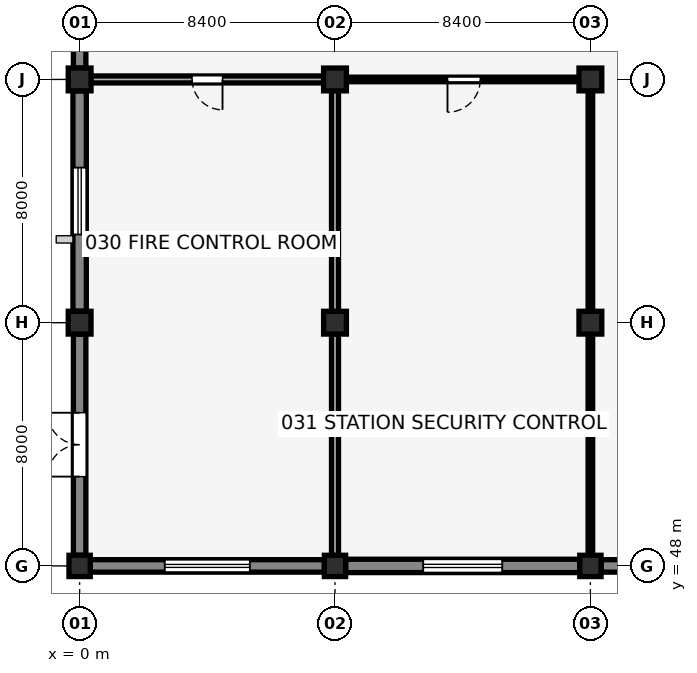
"""IFC4 building model, lengths in metres.
Left out: names, types, materials, properties, quantities, classifications, styles, units other than length and angle.
Written with IfcOpenShell. Run it as: python <this file> out.ifc"""

import sys

from ifc_helpers import new_model, si_unit, direction, frame, frame_2d, origin, origin_2d, place, context, subcontext, project, spatial, rectangle, extrude, element, fill, save


model = new_model("IFC4")
c1 = context("Model", 3, precision=1e-05, world=origin(), true_north=direction((0.0, 1.0)))
c2 = subcontext(c1, "Body", "Model", "MODEL_VIEW")
j1 = project(units=[si_unit("LENGTHUNIT", "METRE"), si_unit("PLANEANGLEUNIT", "RADIAN")], contexts=[c1])
p1 = place(None, origin())
s1 = spatial("IfcSite", under=j1, at=p1, CompositionType="ELEMENT")
p2 = place(p1, origin())
s2 = spatial("IfcBuilding", under=s1, at=p2, CompositionType="ELEMENT")
p3 = place(p2, origin())
s3 = spatial("IfcBuildingStorey", under=s2, at=p3, CompositionType="ELEMENT", Elevation=0.0)
p4 = place(p3, frame((0.0, 48.0, 0.0), z_axis=(0.0, 0.0, 1.0), x_axis=(1.0, 0.0, 0.0)))
e1 = element("IfcColumn", 1, at=p4, inside=s3, PredefinedType="COLUMN", context=c2, shape_type="SweptSolid", body=[
    extrude(rectangle(XDim=0.7, YDim=0.7, at=origin_2d()), origin(), (0.0, 0.0, 1.0), 5.15),
])
for number, where, z_axis, x_axis in (
    (2, (0.0, 56.0, 0.0), (0.0, 0.0, 1.0), (1.0, 0.0, 0.0)),
    (3, (0.0, 64.0, 0.0), (0.0, 0.0, 1.0), (1.0, 0.0, 0.0)),
):
    element("IfcColumn", number, at=place(p3, frame(where, z_axis=z_axis, x_axis=x_axis)), inside=s3, PredefinedType="COLUMN", context=c2, shape_type="SweptSolid", body=[
        extrude(rectangle(XDim=0.75, YDim=0.75, at=origin_2d()), origin(), (0.0, 0.0, 1.0), 5.15),
    ])
p5 = place(p3, frame((8.4, 48.0, 0.0), z_axis=(0.0, 0.0, 1.0), x_axis=(1.0, 0.0, 0.0)))
e4 = element("IfcColumn", 4, at=p5, inside=s3, PredefinedType="COLUMN", context=c2, shape_type="SweptSolid", body=[
    extrude(rectangle(XDim=0.7, YDim=0.7, at=origin_2d()), origin(), (0.0, 0.0, 1.0), 5.15),
])
for number, where, z_axis, x_axis in (
    (5, (8.4, 56.0, 0.0), (0.0, 0.0, 1.0), (1.0, 0.0, 0.0)),
    (6, (8.4, 64.0, 0.0), (0.0, 0.0, 1.0), (1.0, 0.0, 0.0)),
):
    element("IfcColumn", number, at=place(p3, frame(where, z_axis=z_axis, x_axis=x_axis)), inside=s3, PredefinedType="COLUMN", context=c2, shape_type="SweptSolid", body=[
        extrude(rectangle(XDim=0.75, YDim=0.75, at=origin_2d()), origin(), (0.0, 0.0, 1.0), 5.15),
    ])
p6 = place(p3, frame((16.8, 48.0, 0.0), z_axis=(0.0, 0.0, 1.0), x_axis=(1.0, 0.0, 0.0)))
e7 = element("IfcColumn", 7, at=p6, inside=s3, PredefinedType="COLUMN", context=c2, shape_type="SweptSolid", body=[
    extrude(rectangle(XDim=0.7, YDim=0.7, at=origin_2d()), origin(), (0.0, 0.0, 1.0), 5.15),
])
for number, where, z_axis, x_axis in (
    (8, (16.8, 56.0, 0.0), (0.0, 0.0, 1.0), (1.0, 0.0, 0.0)),
    (9, (16.8, 64.0, 0.0), (0.0, 0.0, 1.0), (1.0, 0.0, 0.0)),
):
    element("IfcColumn", number, at=place(p3, frame(where, z_axis=z_axis, x_axis=x_axis)), inside=s3, PredefinedType="COLUMN", context=c2, shape_type="SweptSolid", body=[
        extrude(rectangle(XDim=0.75, YDim=0.75, at=origin_2d()), origin(), (0.0, 0.0, 1.0), 5.15),
    ])
p7 = place(p3, frame((0.35, 48.0, 0.0), z_axis=(0.0, 0.0, 1.0), x_axis=(1.0, 0.0, 0.0)))
e10 = element("IfcWall", 10, at=p7, inside=s3, PredefinedType="SOLIDWALL", context=c2, shape_type="SweptSolid", body=[
    extrude(rectangle(XDim=7.7, YDim=0.41, at=frame_2d((3.85, 0.0))), origin(), (0.0, 0.0, 1.0), 4.74),
])
p8 = place(p7, frame((2.45, 0.0, 0.9), z_axis=(0.0, 0.0, 1.0), x_axis=(1.0, 0.0, 0.0)))
e11 = element("IfcOpeningElement", 11, at=p8, cuts=e10, PredefinedType="OPENING", context=c2, shape_type="SweptSolid", body=[
    extrude(rectangle(XDim=2.8, YDim=1.6, at=frame_2d((1.4, 0.8))), frame((0.0, 0.215, 0.0), z_axis=(0.0, -1.0, 0.0), x_axis=(1.0, 0.0, 0.0)), (0.0, 0.0, 1.0), 0.43),
])
p9 = place(p3, frame((8.75, 48.0, 0.0), z_axis=(0.0, 0.0, 1.0), x_axis=(1.0, 0.0, 0.0)))
e12 = element("IfcWall", 12, at=p9, inside=s3, PredefinedType="SOLIDWALL", context=c2, shape_type="SweptSolid", body=[
    extrude(rectangle(XDim=7.7, YDim=0.44, at=frame_2d((3.85, 0.0))), origin(), (0.0, 0.0, 1.0), 4.74),
])
p10 = place(p9, frame((2.55, 0.0, 0.9), z_axis=(0.0, 0.0, 1.0), x_axis=(1.0, 0.0, 0.0)))
e13 = element("IfcOpeningElement", 13, at=p10, cuts=e12, PredefinedType="OPENING", context=c2, shape_type="SweptSolid", body=[
    extrude(rectangle(XDim=2.6, YDim=1.8, at=frame_2d((1.3, 0.9))), frame((0.0, 0.23, 0.0), z_axis=(0.0, -1.0, 0.0), x_axis=(1.0, 0.0, 0.0)), (0.0, 0.0, 1.0), 0.46),
])
p11 = place(p3, frame((17.15, 48.0, 0.0), z_axis=(0.0, 0.0, 1.0), x_axis=(1.0, 0.0, 0.0)))
e14 = element("IfcWall", 14, at=p11, inside=s3, PredefinedType="SOLIDWALL", context=c2, shape_type="SweptSolid", body=[
    extrude(rectangle(XDim=7.7, YDim=0.41, at=frame_2d((3.85, 0.0))), origin(), (0.0, 0.0, 1.0), 4.74),
])
p12 = place(p11, frame((2.65, 0.0, 0.9), z_axis=(0.0, 0.0, 1.0), x_axis=(1.0, 0.0, 0.0)))
e15 = element("IfcOpeningElement", 15, at=p12, cuts=e14, PredefinedType="OPENING", context=c2, shape_type="SweptSolid", body=[
    extrude(rectangle(XDim=2.4, YDim=1.75, at=frame_2d((1.2, 0.875))), frame((0.0, 0.215, 0.0), z_axis=(0.0, -1.0, 0.0), x_axis=(1.0, 0.0, 0.0)), (0.0, 0.0, 1.0), 0.43),
])
p13 = place(p3, frame((0.0, 48.35, 0.0), z_axis=(0.0, 0.0, 1.0), x_axis=(0.0, 1.0, 0.0)))
e16 = element("IfcWall", 16, at=p13, inside=s3, PredefinedType="SOLIDWALL", context=c2, shape_type="SweptSolid", body=[
    extrude(rectangle(XDim=7.275, YDim=0.41, at=frame_2d((3.637, 0.0))), origin(), (0.0, 0.0, 1.0), 4.747),
])
p14 = place(p13, frame((2.587, 0.0, 0.0), z_axis=(0.0, 0.0, 1.0), x_axis=(1.0, 0.0, 0.0)))
e17 = element("IfcOpeningElement", 17, at=p14, cuts=e16, PredefinedType="OPENING", context=c2, shape_type="SweptSolid", body=[
    extrude(rectangle(XDim=2.1, YDim=2.45, at=frame_2d((1.05, 1.225))), frame((0.0, 0.215, 0.0), z_axis=(0.0, -1.0, 0.0), x_axis=(1.0, 0.0, 0.0)), (0.0, 0.0, 1.0), 0.43),
])
p15 = place(p3, frame((0.0, 56.375, 0.0), z_axis=(0.0, 0.0, 1.0), x_axis=(0.0, 1.0, 0.0)))
e18 = element("IfcWall", 18, at=p15, inside=s3, PredefinedType="SOLIDWALL", context=c2, shape_type="SweptSolid", body=[
    extrude(rectangle(XDim=7.25, YDim=0.44, at=frame_2d((3.625, 0.0))), origin(), (0.0, 0.0, 1.0), 4.747),
])
p16 = place(p15, frame((2.525, 0.0, 0.9), z_axis=(0.0, 0.0, 1.0), x_axis=(1.0, 0.0, 0.0)))
e19 = element("IfcOpeningElement", 19, at=p16, cuts=e18, PredefinedType="OPENING", context=c2, shape_type="SweptSolid", body=[
    extrude(rectangle(XDim=2.2, YDim=1.5, at=frame_2d((1.1, 0.75))), frame((0.0, 0.23, 0.0), z_axis=(0.0, -1.0, 0.0), x_axis=(1.0, 0.0, 0.0)), (0.0, 0.0, 1.0), 0.46),
])
p17 = place(p3, frame((0.0, 64.375, 0.0), z_axis=(0.0, 0.0, 1.0), x_axis=(0.0, 1.0, 0.0)))
e20 = element("IfcWall", 20, at=p17, inside=s3, PredefinedType="SOLIDWALL", context=c2, shape_type="SweptSolid", body=[
    extrude(rectangle(XDim=7.25, YDim=0.41, at=frame_2d((3.625, 0.0))), origin(), (0.0, 0.0, 1.0), 4.85),
])
p18 = place(p3, frame((0.365, 64.0, 0.0), z_axis=(0.0, 0.0, 1.0), x_axis=(1.0, 0.0, 0.0)))
e21 = element("IfcWall", 21, at=p18, inside=s3, PredefinedType="PARTITIONING", context=c2, shape_type="SweptSolid", body=[
    extrude(rectangle(XDim=7.67, YDim=0.23, at=frame_2d((3.835, 0.0))), origin(), (0.0, 0.0, 1.0), 4.605),
])
p19 = place(p18, frame((4.335, 0.0, 0.0), z_axis=(0.0, 0.0, 1.0), x_axis=(-1.0, 0.0, 0.0)))
e22 = element("IfcOpeningElement", 22, at=p19, cuts=e21, PredefinedType="OPENING", context=c2, shape_type="SweptSolid", body=[
    extrude(rectangle(XDim=1.0, YDim=2.15, at=frame_2d((0.5, 1.075))), frame((0.0, 0.125, 0.0), z_axis=(0.0, -1.0, 0.0), x_axis=(1.0, 0.0, 0.0)), (0.0, 0.0, 1.0), 0.25),
])
p20 = place(p3, frame((8.765, 64.0, 0.0), z_axis=(0.0, 0.0, 1.0), x_axis=(1.0, 0.0, 0.0)))
e23 = element("IfcWall", 23, at=p20, inside=s3, PredefinedType="PARTITIONING", context=c2, shape_type="SweptSolid", body=[
    extrude(rectangle(XDim=7.67, YDim=0.15, at=frame_2d((3.835, 0.0))), origin(), (0.0, 0.0, 1.0), 4.605),
])
p21 = place(p20, frame((4.415, 0.0, 0.0), z_axis=(0.0, 0.0, 1.0), x_axis=(-1.0, 0.0, 0.0)))
e24 = element("IfcOpeningElement", 24, at=p21, cuts=e23, PredefinedType="OPENING", context=c2, shape_type="SweptSolid", body=[
    extrude(rectangle(XDim=1.08, YDim=2.18, at=frame_2d((0.54, 1.09))), frame((0.0, 0.085, 0.0), z_axis=(0.0, -1.0, 0.0), x_axis=(1.0, 0.0, 0.0)), (0.0, 0.0, 1.0), 0.17),
])
p22 = place(p3, frame((8.4, 48.34, 0.0), z_axis=(0.0, 0.0, 1.0), x_axis=(0.0, 1.0, 0.0)))
e25 = element("IfcWall", 25, at=p22, inside=s3, PredefinedType="PARTITIONING", context=c2, shape_type="SweptSolid", body=[
    extrude(rectangle(XDim=7.295, YDim=0.23, at=frame_2d((3.647, 0.0))), origin(), (0.0, 0.0, 1.0), 4.542),
])
p23 = place(p3, frame((8.4, 56.365, 0.0), z_axis=(0.0, 0.0, 1.0), x_axis=(0.0, 1.0, 0.0)))
e26 = element("IfcWall", 26, at=p23, inside=s3, PredefinedType="PARTITIONING", context=c2, shape_type="SweptSolid", body=[
    extrude(rectangle(XDim=7.27, YDim=0.23, at=frame_2d((3.635, 0.0))), origin(), (0.0, 0.0, 1.0), 4.542),
])
p24 = place(p3, frame((16.8, 48.34, 0.0), z_axis=(0.0, 0.0, 1.0), x_axis=(0.0, 1.0, 0.0)))
e27 = element("IfcWall", 27, at=p24, inside=s3, PredefinedType="PARTITIONING", context=c2, shape_type="SweptSolid", body=[
    extrude(rectangle(XDim=7.295, YDim=0.15, at=frame_2d((3.647, 0.0))), origin(), (0.0, 0.0, 1.0), 4.542),
])
p25 = place(p3, frame((16.8, 56.365, 0.0), z_axis=(0.0, 0.0, 1.0), x_axis=(0.0, 1.0, 0.0)))
e28 = element("IfcWall", 28, at=p25, inside=s3, PredefinedType="PARTITIONING", context=c2, shape_type="SweptSolid", body=[
    extrude(rectangle(XDim=7.27, YDim=0.15, at=frame_2d((3.635, 0.0))), origin(), (0.0, 0.0, 1.0), 4.542),
])
p26 = place(p8, origin())
e29 = element("IfcWindow", 29, at=p26, inside=s3, PartitioningType="DOUBLE_PANEL_VERTICAL", PredefinedType="WINDOW", context=c2, shape_type="SweptSolid", body=[
    extrude(rectangle(XDim=2.8, YDim=1.6, at=frame_2d((1.4, 0.8))), frame((0.0, 0.03, 0.0), z_axis=(0.0, -1.0, 0.0), x_axis=(1.0, 0.0, 0.0)), (0.0, 0.0, 1.0), 0.06),
])
fill(e11, e29)
p27 = place(p10, origin())
e30 = element("IfcWindow", 30, at=p27, inside=s3, PartitioningType="DOUBLE_PANEL_VERTICAL", PredefinedType="WINDOW", context=c2, shape_type="SweptSolid", body=[
    extrude(rectangle(XDim=2.6, YDim=1.8, at=frame_2d((1.3, 0.9))), frame((0.0, 0.03, 0.0), z_axis=(0.0, -1.0, 0.0), x_axis=(1.0, 0.0, 0.0)), (0.0, 0.0, 1.0), 0.06),
])
fill(e13, e30)
p28 = place(p14, origin())
e31 = element("IfcDoor", 31, at=p28, inside=s3, OperationType="DOUBLE_DOOR_SINGLE_SWING", PredefinedType="DOOR", context=c2, shape_type="SweptSolid", body=[
    extrude(rectangle(XDim=2.1, YDim=2.45, at=frame_2d((1.05, 1.225))), frame((0.0, 0.025, 0.0), z_axis=(0.0, -1.0, 0.0), x_axis=(1.0, 0.0, 0.0)), (0.0, 0.0, 1.0), 0.05),
])
fill(e17, e31)
p29 = place(p16, origin())
e32 = element("IfcWindow", 32, at=p29, inside=s3, PartitioningType="DOUBLE_PANEL_VERTICAL", PredefinedType="WINDOW", context=c2, shape_type="SweptSolid", body=[
    extrude(rectangle(XDim=2.2, YDim=1.5, at=frame_2d((1.1, 0.75))), frame((0.0, 0.03, 0.0), z_axis=(0.0, -1.0, 0.0), x_axis=(1.0, 0.0, 0.0)), (0.0, 0.0, 1.0), 0.06),
])
fill(e19, e32)
p30 = place(p19, origin())
e33 = element("IfcDoor", 33, at=p30, inside=s3, OperationType="SINGLE_SWING_LEFT", PredefinedType="DOOR", context=c2, shape_type="SweptSolid", body=[
    extrude(rectangle(XDim=1.0, YDim=2.15, at=frame_2d((0.5, 1.075))), frame((0.0, 0.025, 0.0), z_axis=(0.0, -1.0, 0.0), x_axis=(1.0, 0.0, 0.0)), (0.0, 0.0, 1.0), 0.05),
])
fill(e22, e33)
p31 = place(p21, origin())
e34 = element("IfcDoor", 34, at=p31, inside=s3, OperationType="SINGLE_SWING_RIGHT", PredefinedType="DOOR", context=c2, shape_type="SweptSolid", body=[
    extrude(rectangle(XDim=1.08, YDim=2.18, at=frame_2d((0.54, 1.09))), frame((0.0, 0.025, 0.0), z_axis=(0.0, -1.0, 0.0), x_axis=(1.0, 0.0, 0.0)), (0.0, 0.0, 1.0), 0.05),
])
fill(e24, e34)
save(model, sys.argv[1])
